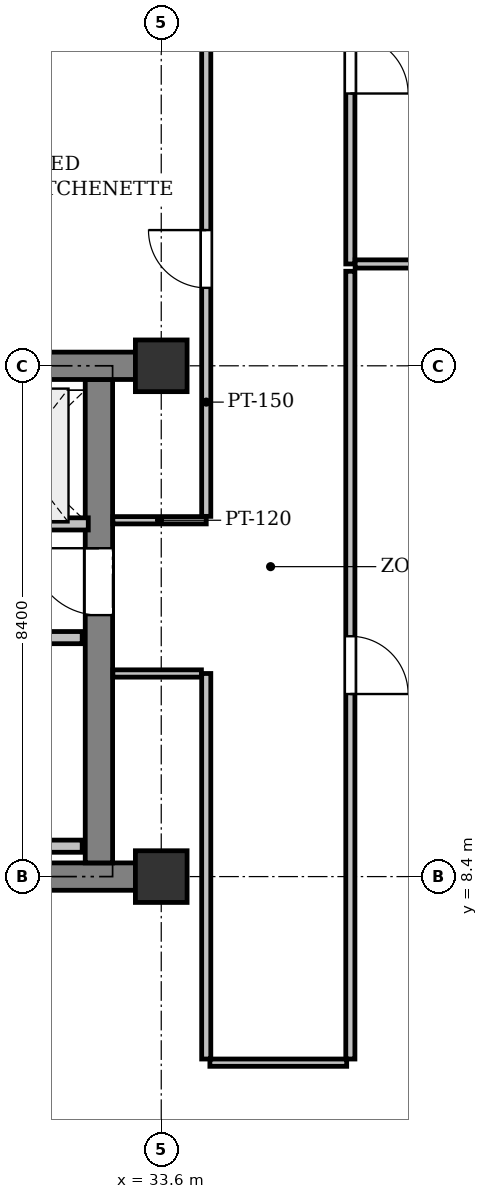
"""IFC4 building model, lengths in metres.
Left out: names, types, materials, properties, quantities, classifications, styles, units other than length and angle.
Written with IfcOpenShell. Run it as: python <this file> out.ifc"""

import sys

from ifc_helpers import new_model, si_unit, direction, frame, frame_2d, origin, origin_2d, place, context, subcontext, project, spatial, rectangle, extrude, element, fill, save


model = new_model("IFC4")
c1 = context("Model", 3, precision=1e-05, world=origin(), true_north=direction((0.0, 1.0)))
c2 = subcontext(c1, "Body", "Model", "MODEL_VIEW")
j1 = project(units=[si_unit("LENGTHUNIT", "METRE"), si_unit("PLANEANGLEUNIT", "RADIAN")], contexts=[c1])
p1 = place(None, origin())
s1 = spatial("IfcSite", under=j1, at=p1, CompositionType="ELEMENT")
p2 = place(p1, origin())
s2 = spatial("IfcBuilding", under=s1, at=p2, CompositionType="ELEMENT")
p3 = place(p2, frame((0.0, 0.0, 250.2)))
s3 = spatial("IfcBuildingStorey", under=s2, at=p3, CompositionType="ELEMENT", Elevation=250.2)
for number, where, z_axis, x_axis in (
    (1, (33.6, 8.4, 0.0), (0.0, 0.0, 1.0), (1.0, 0.0, 0.0)),
    (2, (33.6, 16.8, 0.0), (0.0, 0.0, 1.0), (1.0, 0.0, 0.0)),
):
    element("IfcColumn", number, at=place(p3, frame(where, z_axis=z_axis, x_axis=x_axis)), inside=s3, PredefinedType="COLUMN", context=c2, shape_type="SweptSolid", body=[
        extrude(rectangle(XDim=0.85, YDim=0.85, at=origin_2d()), origin(), (0.0, 0.0, 1.0), 4.0),
    ])
p4 = place(p3, frame((25.625, 8.4, 0.0), z_axis=(0.0, 0.0, 1.0), x_axis=(1.0, 0.0, 0.0)))
e3 = element("IfcWall", 3, at=p4, inside=s3, PredefinedType="SHEAR", context=c2, shape_type="SweptSolid", body=[
    extrude(rectangle(XDim=7.55, YDim=0.45, at=frame_2d((3.775, 0.0))), origin(), (0.0, 0.0, 1.0), 3.725),
])
p5 = place(p3, frame((32.575, 8.625, 0.0), z_axis=(0.0, 0.0, 1.0), x_axis=(0.0, 1.0, 0.0)))
e4 = element("IfcWall", 4, at=p5, inside=s3, PredefinedType="SHEAR", context=c2, shape_type="SweptSolid", body=[
    extrude(rectangle(XDim=7.95, YDim=0.45, at=frame_2d((3.975, 0.0))), origin(), (0.0, 0.0, 1.0), 3.725),
])
p6 = place(p5, frame((4.075, 0.0, 0.0)))
e5 = element("IfcOpeningElement", 5, at=p6, cuts=e4, PredefinedType="OPENING", context=c2, shape_type="SweptSolid", body=[
    extrude(rectangle(XDim=1.1, YDim=2.15, at=frame_2d((0.55, 1.075))), frame((0.0, 0.235, 0.0), z_axis=(0.0, -1.0, 0.0), x_axis=(1.0, 0.0, 0.0)), (0.0, 0.0, 1.0), 0.47),
])
p7 = place(p3, frame((25.625, 16.8, 0.0), z_axis=(0.0, 0.0, 1.0), x_axis=(1.0, 0.0, 0.0)))
e6 = element("IfcWall", 6, at=p7, inside=s3, PredefinedType="SHEAR", context=c2, shape_type="SweptSolid", body=[
    extrude(rectangle(XDim=7.55, YDim=0.45, at=frame_2d((3.775, 0.0))), origin(), (0.0, 0.0, 1.0), 3.725),
])
p8 = place(p3, frame((30.05, 14.2, 0.0), z_axis=(0.0, 0.0, 1.0), x_axis=(1.0, 0.0, 0.0)))
e7 = element("IfcWall", 7, at=p8, inside=s3, PredefinedType="PARTITIONING", context=c2, shape_type="SweptSolid", body=[
    extrude(rectangle(XDim=2.35, YDim=0.2, at=frame_2d((1.175, 0.0))), origin(), (0.0, 0.0, 1.0), 3.725),
])
p9 = place(p8, frame((0.625, 0.0, 0.0)))
e8 = element("IfcOpeningElement", 8, at=p9, cuts=e7, PredefinedType="OPENING", context=c2, shape_type="SweptSolid", body=[
    extrude(rectangle(XDim=1.1, YDim=2.2, at=frame_2d((0.55, 1.1))), frame((0.0, 0.11, 0.0), z_axis=(0.0, -1.0, 0.0), x_axis=(1.0, 0.0, 0.0)), (0.0, 0.0, 1.0), 0.22),
])
p10 = place(p3, frame((32.3, 12.33, 0.0), z_axis=(0.0, 0.0, 1.0), x_axis=(-1.0, 0.0, 0.0)))
e9 = element("IfcWall", 9, at=p10, inside=s3, PredefinedType="PARTITIONING", context=c2, shape_type="SweptSolid", body=[
    extrude(rectangle(XDim=2.45, YDim=0.2, at=frame_2d((1.225, 0.0))), origin(), (0.0, 0.0, 1.0), 3.725),
])
p11 = place(p10, frame((0.8, 0.0, 0.0)))
e10 = element("IfcOpeningElement", 10, at=p11, cuts=e9, PredefinedType="OPENING", context=c2, shape_type="SweptSolid", body=[
    extrude(rectangle(XDim=0.85, YDim=2.15, at=frame_2d((0.425, 1.075))), frame((0.0, 0.11, 0.0), z_axis=(0.0, -1.0, 0.0), x_axis=(1.0, 0.0, 0.0)), (0.0, 0.0, 1.0), 0.22),
])
p12 = place(p3, frame((29.85, 8.9, 0.0), z_axis=(0.0, 0.0, 1.0), x_axis=(1.0, 0.0, 0.0)))
e11 = element("IfcWall", 11, at=p12, inside=s3, PredefinedType="PARTITIONING", context=c2, shape_type="SweptSolid", body=[
    extrude(rectangle(XDim=2.45, YDim=0.2, at=frame_2d((1.225, 0.0))), origin(), (0.0, 0.0, 1.0), 3.725),
])
p13 = place(p3, frame((32.804, 14.26, 0.0), z_axis=(0.0, 0.0, 1.0), x_axis=(1.0, 0.0, 0.0)))
e12 = element("IfcWall", 12, at=p13, inside=s3, PredefinedType="PARTITIONING", context=c2, shape_type="SweptSolid", body=[
    extrude(rectangle(XDim=1.536, YDim=0.12, at=frame_2d((0.768, 0.0))), origin(), (0.0, 0.0, 1.0), 3.319),
])
p14 = place(p3, frame((34.34, 14.324, 0.0), z_axis=(0.0, 0.0, 1.0), x_axis=(0.0, 1.0, 0.0)))
e13 = element("IfcWall", 13, at=p14, inside=s3, PredefinedType="PARTITIONING", context=c2, shape_type="SweptSolid", body=[
    extrude(rectangle(XDim=8.466, YDim=0.15, at=frame_2d((4.233, 0.0))), origin(), (0.0, 0.0, 1.0), 3.271),
])
p15 = place(p14, frame((3.758, 0.0, 0.0)))
e14 = element("IfcOpeningElement", 14, at=p15, cuts=e13, PredefinedType="OPENING", context=c2, shape_type="SweptSolid", body=[
    extrude(rectangle(XDim=0.95, YDim=2.15, at=frame_2d((0.475, 1.075))), frame((0.0, 0.085, 0.0), z_axis=(0.0, -1.0, 0.0), x_axis=(1.0, 0.0, 0.0)), (0.0, 0.0, 1.0), 0.17),
])
p16 = place(p3, frame((36.71, 25.031, 0.0), z_axis=(0.0, 0.0, 1.0), x_axis=(0.0, -1.0, 0.0)))
e15 = element("IfcWall", 15, at=p16, inside=s3, PredefinedType="PARTITIONING", context=c2, shape_type="SweptSolid", body=[
    extrude(rectangle(XDim=6.556, YDim=0.15, at=frame_2d((3.278, 0.0))), origin(), (0.0, 0.0, 1.0), 3.725),
])
p17 = place(p16, frame((2.803, 0.0, 0.0)))
e16 = element("IfcOpeningElement", 16, at=p17, cuts=e15, PredefinedType="OPENING", context=c2, shape_type="SweptSolid", body=[
    extrude(rectangle(XDim=0.95, YDim=2.15, at=frame_2d((0.475, 1.075))), frame((0.0, 0.085, 0.0), z_axis=(0.0, -1.0, 0.0), x_axis=(1.0, 0.0, 0.0)), (0.0, 0.0, 1.0), 0.17),
])
p18 = place(p3, frame((36.789, 18.475, 0.0), z_axis=(0.0, 0.0, 1.0), x_axis=(1.0, 0.0, 0.0)))
e17 = element("IfcWall", 17, at=p18, inside=s3, PredefinedType="PARTITIONING", context=c2, shape_type="SweptSolid", body=[
    extrude(rectangle(XDim=5.042, YDim=0.135, at=frame_2d((2.521, 0.0))), origin(), (0.0, 0.0, 1.0), 3.421),
])
p19 = place(p3, frame((36.71, 18.355, 0.0), z_axis=(0.0, 0.0, 1.0), x_axis=(0.0, -1.0, 0.0)))
e18 = element("IfcWall", 18, at=p19, inside=s3, PredefinedType="PARTITIONING", context=c2, shape_type="SweptSolid", body=[
    extrude(rectangle(XDim=12.955, YDim=0.15, at=frame_2d((6.478, 0.0))), origin(), (0.0, 0.0, 1.0), 3.271),
])
p20 = place(p19, frame((6.002, 0.0, 0.0)))
e19 = element("IfcOpeningElement", 19, at=p20, cuts=e18, PredefinedType="OPENING", context=c2, shape_type="SweptSolid", body=[
    extrude(rectangle(XDim=0.95, YDim=2.15, at=frame_2d((0.475, 1.075))), frame((0.0, 0.085, 0.0), z_axis=(0.0, -1.0, 0.0), x_axis=(1.0, 0.0, 0.0)), (0.0, 0.0, 1.0), 0.17),
])
p21 = place(p3, frame((36.65, 5.34, 0.0), z_axis=(0.0, 0.0, 1.0), x_axis=(-1.0, 0.0, 0.0)))
e20 = element("IfcWall", 20, at=p21, inside=s3, PredefinedType="PARTITIONING", context=c2, shape_type="SweptSolid", body=[
    extrude(rectangle(XDim=2.25, YDim=0.12, at=frame_2d((1.125, 0.0))), origin(), (0.0, 0.0, 1.0), 3.725),
])
p22 = place(p3, frame((34.34, 5.4, 0.0), z_axis=(0.0, 0.0, 1.0), x_axis=(0.0, 1.0, 0.0)))
e21 = element("IfcWall", 21, at=p22, inside=s3, PredefinedType="PARTITIONING", context=c2, shape_type="SweptSolid", body=[
    extrude(rectangle(XDim=6.34, YDim=0.15, at=frame_2d((3.17, 0.0))), origin(), (0.0, 0.0, 1.0), 3.271),
])
p23 = place(p3, frame((34.261, 11.74, 0.0), z_axis=(0.0, 0.0, 1.0), x_axis=(-1.0, 0.0, 0.0)))
e22 = element("IfcWall", 22, at=p23, inside=s3, PredefinedType="PARTITIONING", context=c2, shape_type="SweptSolid", body=[
    extrude(rectangle(XDim=1.457, YDim=0.12, at=frame_2d((0.729, 0.0))), origin(), (0.0, 0.0, 1.0), 3.319),
])
p24 = place(p6, origin())
e23 = element("IfcDoor", 23, at=p24, inside=s3, OperationType="SINGLE_SWING_RIGHT", PredefinedType="DOOR", context=c2, shape_type="SweptSolid", body=[
    extrude(rectangle(XDim=1.1, YDim=2.15, at=frame_2d((0.55, 1.075))), frame((0.0, 0.025, 0.0), z_axis=(0.0, -1.0, 0.0), x_axis=(1.0, 0.0, 0.0)), (0.0, 0.0, 1.0), 0.05),
])
fill(e5, e23)
p25 = place(p15, origin())
e24 = element("IfcDoor", 24, at=p25, inside=s3, OperationType="SINGLE_SWING_RIGHT", PredefinedType="DOOR", context=c2, shape_type="SweptSolid", body=[
    extrude(rectangle(XDim=0.95, YDim=2.15, at=frame_2d((0.475, 1.075))), frame((0.0, 0.025, 0.0), z_axis=(0.0, -1.0, 0.0), x_axis=(1.0, 0.0, 0.0)), (0.0, 0.0, 1.0), 0.05),
])
fill(e14, e24)
p26 = place(p17, origin())
e25 = element("IfcDoor", 25, at=p26, inside=s3, OperationType="SINGLE_SWING_RIGHT", PredefinedType="DOOR", context=c2, shape_type="SweptSolid", body=[
    extrude(rectangle(XDim=0.95, YDim=2.15, at=frame_2d((0.475, 1.075))), frame((0.0, 0.025, 0.0), z_axis=(0.0, -1.0, 0.0), x_axis=(1.0, 0.0, 0.0)), (0.0, 0.0, 1.0), 0.05),
])
fill(e16, e25)
p27 = place(p20, origin())
e26 = element("IfcDoor", 26, at=p27, inside=s3, OperationType="SINGLE_SWING_RIGHT", PredefinedType="DOOR", context=c2, shape_type="SweptSolid", body=[
    extrude(rectangle(XDim=0.95, YDim=2.15, at=frame_2d((0.475, 1.075))), frame((0.0, 0.025, 0.0), z_axis=(0.0, -1.0, 0.0), x_axis=(1.0, 0.0, 0.0)), (0.0, 0.0, 1.0), 0.05),
])
fill(e19, e26)
save(model, sys.argv[1])
